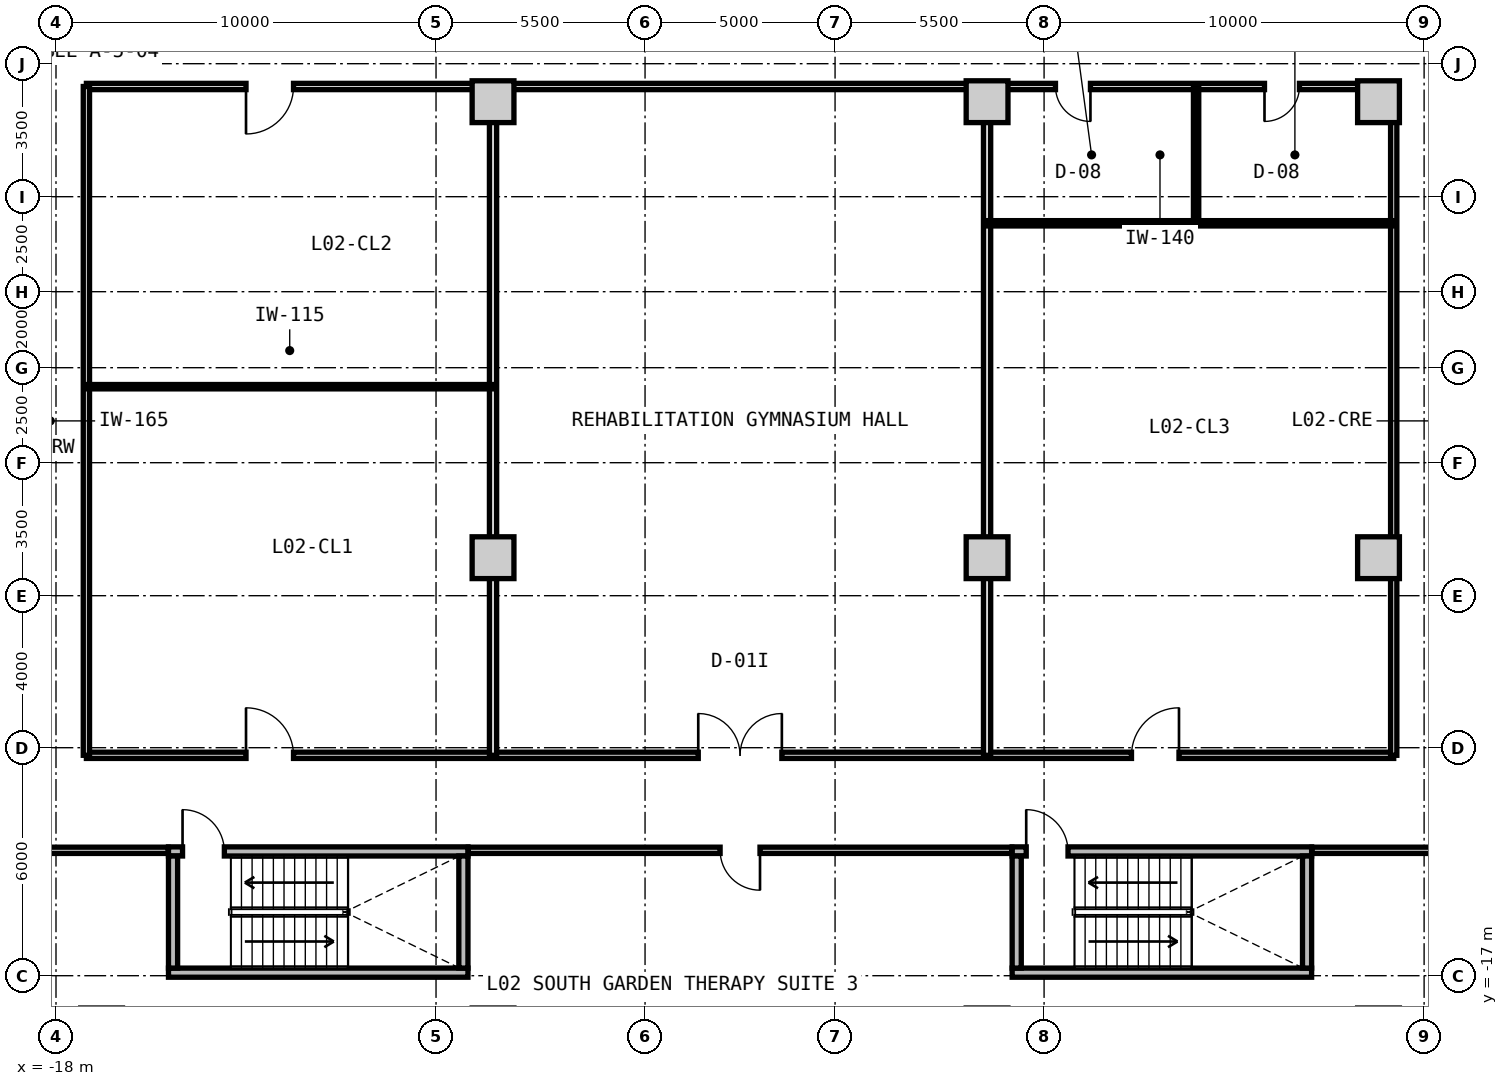
"""IFC4 building model, lengths in metres.
Left out: names, types, materials, properties, quantities, classifications, styles, units other than length and angle.
Written with IfcOpenShell. Run it as: python <this file> out.ifc"""

import sys

from ifc_helpers import new_model, si_unit, direction, frame, frame_2d, origin, origin_2d, place, context, subcontext, project, spatial, rectangle, extrude, source, transform, mapped, element, fill, save


model = new_model("IFC4")
c1 = context("Model", 3, precision=1e-05, world=origin(), true_north=direction((0.0, 1.0)))
c2 = subcontext(c1, "Body", "Model", "MODEL_VIEW")
j1 = project(units=[si_unit("LENGTHUNIT", "METRE"), si_unit("PLANEANGLEUNIT", "RADIAN")], contexts=[c1])
p1 = place(None, origin())
s1 = spatial("IfcSite", under=j1, at=p1, CompositionType="ELEMENT")
p2 = place(p1, origin())
s2 = spatial("IfcBuilding", under=s1, at=p2, CompositionType="ELEMENT")
p3 = place(p2, frame((0.0, 0.0, 8.4)))
s3 = spatial("IfcBuildingStorey", under=s2, at=p3, CompositionType="ELEMENT", Elevation=8.4)
m1 = source(origin(), c2, "Body", "SweptSolid", [
    extrude(rectangle(XDim=1.1, YDim=1.1, at=origin_2d()), origin(), (0.0, 0.0, 1.0), 4.2),
])
for number, where, z_axis, x_axis in (
    (1, (-6.5, -6.0, 0.0), (0.0, 0.0, 1.0), (1.0, 0.0, 0.0)),
    (2, (-6.5, 6.0, 0.0), (0.0, 0.0, 1.0), (1.0, 0.0, 0.0)),
    (3, (6.5, -6.0, 0.0), (0.0, 0.0, 1.0), (1.0, 0.0, 0.0)),
    (4, (6.5, 6.0, 0.0), (0.0, 0.0, 1.0), (1.0, 0.0, 0.0)),
    (5, (16.8, -6.0, 0.0), (0.0, 0.0, 1.0), (1.0, 0.0, 0.0)),
    (6, (16.8, 6.0, 0.0), (0.0, 0.0, 1.0), (1.0, 0.0, 0.0)),
):
    element("IfcColumn", number, at=place(p3, frame(where, z_axis=z_axis, x_axis=x_axis)), inside=s3, PredefinedType="COLUMN", context=c2, shape_type="MappedRepresentation", body=[
        mapped(m1, transform((0.0, 0.0, 0.0), x_axis=(1.0, 0.0, 0.0), y_axis=(0.0, 1.0, 0.0), z_axis=(0.0, 0.0, 1.0), scale=1.0)),
    ])
m2 = source(origin(), c2, "Body", "SweptSolid", [
    extrude(rectangle(XDim=7.88, YDim=0.24, at=frame_2d((3.94, 0.0))), origin(), (0.0, 0.0, 1.0), 3.88),
])
p4 = place(p3, frame((-15.04, -13.73, 0.0), z_axis=(0.0, 0.0, 1.0), x_axis=(1.0, 0.0, 0.0)))
e7 = element("IfcWall", 7, at=p4, inside=s3, PredefinedType="PARTITIONING", context=c2, shape_type="MappedRepresentation", body=[
    mapped(m2, transform((0.0, 0.0, 0.0), x_axis=(1.0, 0.0, 0.0), y_axis=(0.0, 1.0, 0.0), z_axis=(0.0, 0.0, 1.0), scale=1.0)),
])
p5 = place(p4, frame((0.37, 0.0, 0.0)))
e8 = element("IfcOpeningElement", 8, at=p5, cuts=e7, PredefinedType="OPENING", context=c2, shape_type="SweptSolid", body=[
    extrude(rectangle(XDim=1.1, YDim=2.15, at=frame_2d((0.55, 1.075))), frame((0.0, 0.13, 0.0), z_axis=(0.0, -1.0, 0.0), x_axis=(1.0, 0.0, 0.0)), (0.0, 0.0, 1.0), 0.26),
])
p6 = place(p3, frame((-15.04, -16.92, 0.0), z_axis=(0.0, 0.0, 1.0), x_axis=(1.0, 0.0, 0.0)))
e9 = element("IfcWall", 9, at=p6, inside=s3, PredefinedType="PARTITIONING", context=c2, shape_type="MappedRepresentation", body=[
    mapped(m2, transform((0.0, 0.0, 0.0), x_axis=(1.0, 0.0, 0.0), y_axis=(0.0, 1.0, 0.0), z_axis=(0.0, 0.0, 1.0), scale=1.0)),
])
m3 = source(origin(), c2, "Body", "SweptSolid", [
    extrude(rectangle(XDim=2.95, YDim=0.24, at=frame_2d((1.475, 0.0))), origin(), (0.0, 0.0, 1.0), 3.88),
])
for number, where, z_axis, x_axis in (
    (10, (-14.92, -16.8, 0.0), (0.0, 0.0, 1.0), (0.0, 1.0, 0.0)),
    (11, (-7.28, -16.8, 0.0), (0.0, 0.0, 1.0), (0.0, 1.0, 0.0)),
):
    element("IfcWall", number, at=place(p3, frame(where, z_axis=z_axis, x_axis=x_axis)), inside=s3, PredefinedType="PARTITIONING", context=c2, shape_type="MappedRepresentation", body=[
        mapped(m3, transform((0.0, 0.0, 0.0), x_axis=(1.0, 0.0, 0.0), y_axis=(0.0, 1.0, 0.0), z_axis=(0.0, 0.0, 1.0), scale=1.0)),
    ])
p7 = place(p3, frame((7.16, -13.73, 0.0), z_axis=(0.0, 0.0, 1.0), x_axis=(1.0, 0.0, 0.0)))
e12 = element("IfcWall", 12, at=p7, inside=s3, PredefinedType="PARTITIONING", context=c2, shape_type="MappedRepresentation", body=[
    mapped(m2, transform((0.0, 0.0, 0.0), x_axis=(1.0, 0.0, 0.0), y_axis=(0.0, 1.0, 0.0), z_axis=(0.0, 0.0, 1.0), scale=1.0)),
])
p8 = place(p7, frame((0.37, 0.0, 0.0)))
e13 = element("IfcOpeningElement", 13, at=p8, cuts=e12, PredefinedType="OPENING", context=c2, shape_type="SweptSolid", body=[
    extrude(rectangle(XDim=1.1, YDim=2.15, at=frame_2d((0.55, 1.075))), frame((0.0, 0.13, 0.0), z_axis=(0.0, -1.0, 0.0), x_axis=(1.0, 0.0, 0.0)), (0.0, 0.0, 1.0), 0.26),
])
p9 = place(p3, frame((7.16, -16.92, 0.0), z_axis=(0.0, 0.0, 1.0), x_axis=(1.0, 0.0, 0.0)))
e14 = element("IfcWall", 14, at=p9, inside=s3, PredefinedType="PARTITIONING", context=c2, shape_type="MappedRepresentation", body=[
    mapped(m2, transform((0.0, 0.0, 0.0), x_axis=(1.0, 0.0, 0.0), y_axis=(0.0, 1.0, 0.0), z_axis=(0.0, 0.0, 1.0), scale=1.0)),
])
for number, where, z_axis, x_axis in (
    (15, (7.28, -16.8, 0.0), (0.0, 0.0, 1.0), (0.0, 1.0, 0.0)),
    (16, (14.92, -16.8, 0.0), (0.0, 0.0, 1.0), (0.0, 1.0, 0.0)),
):
    element("IfcWall", number, at=place(p3, frame(where, z_axis=z_axis, x_axis=x_axis)), inside=s3, PredefinedType="PARTITIONING", context=c2, shape_type="MappedRepresentation", body=[
        mapped(m3, transform((0.0, 0.0, 0.0), x_axis=(1.0, 0.0, 0.0), y_axis=(0.0, 1.0, 0.0), z_axis=(0.0, 0.0, 1.0), scale=1.0)),
    ])
m4 = source(origin(), c2, "Body", "SweptSolid", [
    extrude(rectangle(XDim=34.4, YDim=0.165, at=frame_2d((17.2, 0.0))), origin(), (0.0, 0.0, 1.0), 3.865),
])
p10 = place(p3, frame((-17.2, -11.2, 0.0), z_axis=(0.0, 0.0, 1.0), x_axis=(1.0, 0.0, 0.0)))
e17 = element("IfcWall", 17, at=p10, inside=s3, PredefinedType="PARTITIONING", context=c2, shape_type="MappedRepresentation", body=[
    mapped(m4, transform((0.0, 0.0, 0.0), x_axis=(1.0, 0.0, 0.0), y_axis=(0.0, 1.0, 0.0), z_axis=(0.0, 0.0, 1.0), scale=1.0)),
])
p11 = place(p10, frame((4.2, 0.0, 0.0)))
e18 = element("IfcOpeningElement", 18, at=p11, cuts=e17, PredefinedType="OPENING", context=c2, shape_type="SweptSolid", body=[
    extrude(rectangle(XDim=1.25, YDim=2.2, at=frame_2d((0.625, 1.1))), frame((0.0, 0.093, 0.0), z_axis=(0.0, -1.0, 0.0), x_axis=(1.0, 0.0, 0.0)), (0.0, 0.0, 1.0), 0.185),
])
p12 = place(p10, frame((16.1, 0.0, 0.0)))
e19 = element("IfcOpeningElement", 19, at=p12, cuts=e17, PredefinedType="OPENING", context=c2, shape_type="SweptSolid", body=[
    extrude(rectangle(XDim=2.2, YDim=2.4, at=frame_2d((1.1, 1.2))), frame((0.0, 0.093, 0.0), z_axis=(0.0, -1.0, 0.0), x_axis=(1.0, 0.0, 0.0)), (0.0, 0.0, 1.0), 0.185),
])
p13 = place(p10, frame((27.5, 0.0, 0.0)))
e20 = element("IfcOpeningElement", 20, at=p13, cuts=e17, PredefinedType="OPENING", context=c2, shape_type="SweptSolid", body=[
    extrude(rectangle(XDim=1.25, YDim=2.2, at=frame_2d((0.625, 1.1))), frame((0.0, 0.093, 0.0), z_axis=(0.0, -1.0, 0.0), x_axis=(1.0, 0.0, 0.0)), (0.0, 0.0, 1.0), 0.185),
])
p14 = place(p3, frame((-17.2, 6.4, 0.0), z_axis=(0.0, 0.0, 1.0), x_axis=(1.0, 0.0, 0.0)))
e21 = element("IfcWall", 21, at=p14, inside=s3, PredefinedType="PARTITIONING", context=c2, shape_type="MappedRepresentation", body=[
    mapped(m4, transform((0.0, 0.0, 0.0), x_axis=(1.0, 0.0, 0.0), y_axis=(0.0, 1.0, 0.0), z_axis=(0.0, 0.0, 1.0), scale=1.0)),
])
p15 = place(p14, frame((4.2, 0.0, 0.0)))
e22 = element("IfcOpeningElement", 22, at=p15, cuts=e21, PredefinedType="OPENING", context=c2, shape_type="SweptSolid", body=[
    extrude(rectangle(XDim=1.25, YDim=2.2, at=frame_2d((0.625, 1.1))), frame((0.0, 0.093, 0.0), z_axis=(0.0, -1.0, 0.0), x_axis=(1.0, 0.0, 0.0)), (0.0, 0.0, 1.0), 0.185),
])
p16 = place(p14, frame((25.5, 0.0, 0.0)))
e23 = element("IfcOpeningElement", 23, at=p16, cuts=e21, PredefinedType="OPENING", context=c2, shape_type="SweptSolid", body=[
    extrude(rectangle(XDim=0.92, YDim=2.1, at=frame_2d((0.46, 1.05))), frame((0.0, 0.093, 0.0), z_axis=(0.0, -1.0, 0.0), x_axis=(1.0, 0.0, 0.0)), (0.0, 0.0, 1.0), 0.185),
])
p17 = place(p14, frame((31.0, 0.0, 0.0)))
e24 = element("IfcOpeningElement", 24, at=p17, cuts=e21, PredefinedType="OPENING", context=c2, shape_type="SweptSolid", body=[
    extrude(rectangle(XDim=0.92, YDim=2.1, at=frame_2d((0.46, 1.05))), frame((0.0, 0.093, 0.0), z_axis=(0.0, -1.0, 0.0), x_axis=(1.0, 0.0, 0.0)), (0.0, 0.0, 1.0), 0.185),
])
m5 = source(origin(), c2, "Body", "SweptSolid", [
    extrude(rectangle(XDim=17.6, YDim=0.165, at=frame_2d((8.8, 0.0))), origin(), (0.0, 0.0, 1.0), 3.865),
])
for number, where, z_axis, x_axis in (
    (25, (-17.2, -11.2, 0.0), (0.0, 0.0, 1.0), (0.0, 1.0, 0.0)),
    (26, (17.2, -11.2, 0.0), (0.0, 0.0, 1.0), (0.0, 1.0, 0.0)),
):
    element("IfcWall", number, at=place(p3, frame(where, z_axis=z_axis, x_axis=x_axis)), inside=s3, PredefinedType="PARTITIONING", context=c2, shape_type="MappedRepresentation", body=[
        mapped(m5, transform((0.0, 0.0, 0.0), x_axis=(1.0, 0.0, 0.0), y_axis=(0.0, 1.0, 0.0), z_axis=(0.0, 0.0, 1.0), scale=1.0)),
    ])
m6 = source(origin(), c2, "Body", "SweptSolid", [
    extrude(rectangle(XDim=17.6, YDim=0.19, at=frame_2d((8.8, 0.0))), origin(), (0.0, 0.0, 1.0), 3.215),
])
for number, where, z_axis, x_axis in (
    (27, (-6.5, -11.2, 0.0), (0.0, 0.0, 1.0), (0.0, 1.0, 0.0)),
    (28, (6.5, -11.2, 0.0), (0.0, 0.0, 1.0), (0.0, 1.0, 0.0)),
):
    element("IfcWall", number, at=place(p3, frame(where, z_axis=z_axis, x_axis=x_axis)), inside=s3, PredefinedType="PARTITIONING", context=c2, shape_type="MappedRepresentation", body=[
        mapped(m6, transform((0.0, 0.0, 0.0), x_axis=(1.0, 0.0, 0.0), y_axis=(0.0, 1.0, 0.0), z_axis=(0.0, 0.0, 1.0), scale=1.0)),
    ])
m7 = source(origin(), c2, "Body", "SweptSolid", [
    extrude(rectangle(XDim=10.7, YDim=0.115, at=frame_2d((5.35, 0.0))), origin(), (0.0, 0.0, 1.0), 3.865),
])
p18 = place(p3, frame((-17.2, -1.5, 0.0), z_axis=(0.0, 0.0, 1.0), x_axis=(1.0, 0.0, 0.0)))
e29 = element("IfcWall", 29, at=p18, inside=s3, PredefinedType="PARTITIONING", context=c2, shape_type="MappedRepresentation", body=[
    mapped(m7, transform((0.0, 0.0, 0.0), x_axis=(1.0, 0.0, 0.0), y_axis=(0.0, 1.0, 0.0), z_axis=(0.0, 0.0, 1.0), scale=1.0)),
])
m8 = source(origin(), c2, "Body", "SweptSolid", [
    extrude(rectangle(XDim=3.6, YDim=0.14, at=frame_2d((1.8, 0.0))), origin(), (0.0, 0.0, 1.0), 3.865),
])
p19 = place(p3, frame((12.0, 2.8, 0.0), z_axis=(0.0, 0.0, 1.0), x_axis=(0.0, 1.0, 0.0)))
e30 = element("IfcWall", 30, at=p19, inside=s3, PredefinedType="PARTITIONING", context=c2, shape_type="MappedRepresentation", body=[
    mapped(m8, transform((0.0, 0.0, 0.0), x_axis=(1.0, 0.0, 0.0), y_axis=(0.0, 1.0, 0.0), z_axis=(0.0, 0.0, 1.0), scale=1.0)),
])
m9 = source(origin(), c2, "Body", "SweptSolid", [
    extrude(rectangle(XDim=10.7, YDim=0.14, at=frame_2d((5.35, 0.0))), origin(), (0.0, 0.0, 1.0), 3.865),
])
p20 = place(p3, frame((6.5, 2.8, 0.0), z_axis=(0.0, 0.0, 1.0), x_axis=(1.0, 0.0, 0.0)))
e31 = element("IfcWall", 31, at=p20, inside=s3, PredefinedType="PARTITIONING", context=c2, shape_type="MappedRepresentation", body=[
    mapped(m9, transform((0.0, 0.0, 0.0), x_axis=(1.0, 0.0, 0.0), y_axis=(0.0, 1.0, 0.0), z_axis=(0.0, 0.0, 1.0), scale=1.0)),
])
m10 = source(origin(), c2, "Body", "SweptSolid", [
    extrude(rectangle(XDim=36.0, YDim=0.165, at=frame_2d((18.0, 0.0))), origin(), (0.0, 0.0, 1.0), 3.865),
])
p21 = place(p3, frame((-51.05, -13.7, 0.0), z_axis=(0.0, 0.0, 1.0), x_axis=(1.0, 0.0, 0.0)))
e32 = element("IfcWall", 32, at=p21, inside=s3, PredefinedType="PARTITIONING", context=c2, shape_type="MappedRepresentation", body=[
    mapped(m10, transform((0.0, 0.0, 0.0), x_axis=(1.0, 0.0, 0.0), y_axis=(0.0, 1.0, 0.0), z_axis=(0.0, 0.0, 1.0), scale=1.0)),
])
p22 = place(p21, frame((11.125, 0.0, 0.0)))
e33 = element("IfcOpeningElement", 33, at=p22, cuts=e32, PredefinedType="OPENING", context=c2, shape_type="SweptSolid", body=[
    extrude(rectangle(XDim=1.05, YDim=2.15, at=frame_2d((0.525, 1.075))), frame((0.0, 0.093, 0.0), z_axis=(0.0, -1.0, 0.0), x_axis=(1.0, 0.0, 0.0)), (0.0, 0.0, 1.0), 0.185),
])
p23 = place(p21, frame((29.0, 0.0, 0.0)))
e34 = element("IfcOpeningElement", 34, at=p23, cuts=e32, PredefinedType="OPENING", context=c2, shape_type="SweptSolid", body=[
    extrude(rectangle(XDim=1.05, YDim=2.15, at=frame_2d((0.525, 1.075))), frame((0.0, 0.093, 0.0), z_axis=(0.0, -1.0, 0.0), x_axis=(1.0, 0.0, 0.0)), (0.0, 0.0, 1.0), 0.185),
])
m11 = source(origin(), c2, "Body", "SweptSolid", [
    extrude(rectangle(XDim=14.3, YDim=0.165, at=frame_2d((7.15, 0.0))), origin(), (0.0, 0.0, 1.0), 3.865),
])
p24 = place(p3, frame((-7.15, -13.7, 0.0), z_axis=(0.0, 0.0, 1.0), x_axis=(1.0, 0.0, 0.0)))
e35 = element("IfcWall", 35, at=p24, inside=s3, PredefinedType="PARTITIONING", context=c2, shape_type="MappedRepresentation", body=[
    mapped(m11, transform((0.0, 0.0, 0.0), x_axis=(1.0, 0.0, 0.0), y_axis=(0.0, 1.0, 0.0), z_axis=(0.0, 0.0, 1.0), scale=1.0)),
])
p25 = place(p24, frame((6.625, 0.0, 0.0)))
e36 = element("IfcOpeningElement", 36, at=p25, cuts=e35, PredefinedType="OPENING", context=c2, shape_type="SweptSolid", body=[
    extrude(rectangle(XDim=1.05, YDim=2.15, at=frame_2d((0.525, 1.075))), frame((0.0, 0.093, 0.0), z_axis=(0.0, -1.0, 0.0), x_axis=(1.0, 0.0, 0.0)), (0.0, 0.0, 1.0), 0.185),
])
p26 = place(p3, frame((15.05, -13.7, 0.0), z_axis=(0.0, 0.0, 1.0), x_axis=(1.0, 0.0, 0.0)))
e37 = element("IfcWall", 37, at=p26, inside=s3, PredefinedType="PARTITIONING", context=c2, shape_type="MappedRepresentation", body=[
    mapped(m10, transform((0.0, 0.0, 0.0), x_axis=(1.0, 0.0, 0.0), y_axis=(0.0, 1.0, 0.0), z_axis=(0.0, 0.0, 1.0), scale=1.0)),
])
p27 = place(p26, frame((5.95, 0.0, 0.0)))
e38 = element("IfcOpeningElement", 38, at=p27, cuts=e37, PredefinedType="OPENING", context=c2, shape_type="SweptSolid", body=[
    extrude(rectangle(XDim=1.05, YDim=2.15, at=frame_2d((0.525, 1.075))), frame((0.0, 0.093, 0.0), z_axis=(0.0, -1.0, 0.0), x_axis=(1.0, 0.0, 0.0)), (0.0, 0.0, 1.0), 0.185),
])
p28 = place(p26, frame((23.825, 0.0, 0.0)))
e39 = element("IfcOpeningElement", 39, at=p28, cuts=e37, PredefinedType="OPENING", context=c2, shape_type="SweptSolid", body=[
    extrude(rectangle(XDim=1.05, YDim=2.15, at=frame_2d((0.525, 1.075))), frame((0.0, 0.093, 0.0), z_axis=(0.0, -1.0, 0.0), x_axis=(1.0, 0.0, 0.0)), (0.0, 0.0, 1.0), 0.185),
])
m12 = source(origin(), c2, "Body", "SweptSolid", [
    extrude(rectangle(XDim=1.1, YDim=2.15, at=frame_2d((0.55, 1.075))), frame((0.0, 0.025, 0.0), z_axis=(0.0, -1.0, 0.0), x_axis=(1.0, 0.0, 0.0)), (0.0, 0.0, 1.0), 0.05),
])
p29 = place(p5, origin())
e40 = element("IfcDoor", 40, at=p29, inside=s3, OperationType="SINGLE_SWING_LEFT", PredefinedType="DOOR", context=c2, shape_type="MappedRepresentation", body=[
    mapped(m12, transform((0.0, 0.0, 0.0), x_axis=(1.0, 0.0, 0.0), y_axis=(0.0, 1.0, 0.0), z_axis=(0.0, 0.0, 1.0), scale=1.0)),
])
fill(e8, e40)
p30 = place(p8, origin())
e41 = element("IfcDoor", 41, at=p30, inside=s3, OperationType="SINGLE_SWING_LEFT", PredefinedType="DOOR", context=c2, shape_type="MappedRepresentation", body=[
    mapped(m12, transform((0.0, 0.0, 0.0), x_axis=(1.0, 0.0, 0.0), y_axis=(0.0, 1.0, 0.0), z_axis=(0.0, 0.0, 1.0), scale=1.0)),
])
fill(e13, e41)
m13 = source(origin(), c2, "Body", "SweptSolid", [
    extrude(rectangle(XDim=1.25, YDim=2.2, at=frame_2d((0.625, 1.1))), frame((0.0, 0.025, 0.0), z_axis=(0.0, -1.0, 0.0), x_axis=(1.0, 0.0, 0.0)), (0.0, 0.0, 1.0), 0.05),
])
p31 = place(p11, origin())
e42 = element("IfcDoor", 42, at=p31, inside=s3, OperationType="SINGLE_SWING_LEFT", PredefinedType="DOOR", context=c2, shape_type="MappedRepresentation", body=[
    mapped(m13, transform((0.0, 0.0, 0.0), x_axis=(1.0, 0.0, 0.0), y_axis=(0.0, 1.0, 0.0), z_axis=(0.0, 0.0, 1.0), scale=1.0)),
])
fill(e18, e42)
m14 = source(origin(), c2, "Body", "SweptSolid", [
    extrude(rectangle(XDim=2.2, YDim=2.4, at=frame_2d((1.1, 1.2))), frame((0.0, 0.025, 0.0), z_axis=(0.0, -1.0, 0.0), x_axis=(1.0, 0.0, 0.0)), (0.0, 0.0, 1.0), 0.05),
])
p32 = place(p12, origin())
e43 = element("IfcDoor", 43, at=p32, inside=s3, OperationType="DOUBLE_DOOR_SINGLE_SWING", PredefinedType="DOOR", context=c2, shape_type="MappedRepresentation", body=[
    mapped(m14, transform((0.0, 0.0, 0.0), x_axis=(1.0, 0.0, 0.0), y_axis=(0.0, 1.0, 0.0), z_axis=(0.0, 0.0, 1.0), scale=1.0)),
])
fill(e19, e43)
p33 = place(p13, origin())
e44 = element("IfcDoor", 44, at=p33, inside=s3, OperationType="SINGLE_SWING_RIGHT", PredefinedType="DOOR", context=c2, shape_type="MappedRepresentation", body=[
    mapped(m13, transform((0.0, 0.0, 0.0), x_axis=(1.0, 0.0, 0.0), y_axis=(0.0, 1.0, 0.0), z_axis=(0.0, 0.0, 1.0), scale=1.0)),
])
fill(e20, e44)
p34 = place(p15, frame((1.25, 0.0, 0.0), z_axis=(0.0, 0.0, 1.0), x_axis=(-1.0, 0.0, 0.0)))
e45 = element("IfcDoor", 45, at=p34, inside=s3, OperationType="SINGLE_SWING_RIGHT", PredefinedType="DOOR", context=c2, shape_type="MappedRepresentation", body=[
    mapped(m13, transform((0.0, 0.0, 0.0), x_axis=(1.0, 0.0, 0.0), y_axis=(0.0, 1.0, 0.0), z_axis=(0.0, 0.0, 1.0), scale=1.0)),
])
fill(e22, e45)
m15 = source(origin(), c2, "Body", "SweptSolid", [
    extrude(rectangle(XDim=0.92, YDim=2.1, at=frame_2d((0.46, 1.05))), frame((0.0, 0.025, 0.0), z_axis=(0.0, -1.0, 0.0), x_axis=(1.0, 0.0, 0.0)), (0.0, 0.0, 1.0), 0.05),
])
p35 = place(p16, frame((0.92, 0.0, 0.0), z_axis=(0.0, 0.0, 1.0), x_axis=(-1.0, 0.0, 0.0)))
e46 = element("IfcDoor", 46, at=p35, inside=s3, OperationType="SINGLE_SWING_LEFT", PredefinedType="DOOR", context=c2, shape_type="MappedRepresentation", body=[
    mapped(m15, transform((0.0, 0.0, 0.0), x_axis=(1.0, 0.0, 0.0), y_axis=(0.0, 1.0, 0.0), z_axis=(0.0, 0.0, 1.0), scale=1.0)),
])
fill(e23, e46)
p36 = place(p17, frame((0.92, 0.0, 0.0), z_axis=(0.0, 0.0, 1.0), x_axis=(-1.0, 0.0, 0.0)))
e47 = element("IfcDoor", 47, at=p36, inside=s3, OperationType="SINGLE_SWING_RIGHT", PredefinedType="DOOR", context=c2, shape_type="MappedRepresentation", body=[
    mapped(m15, transform((0.0, 0.0, 0.0), x_axis=(1.0, 0.0, 0.0), y_axis=(0.0, 1.0, 0.0), z_axis=(0.0, 0.0, 1.0), scale=1.0)),
])
fill(e24, e47)
m16 = source(origin(), c2, "Body", "SweptSolid", [
    extrude(rectangle(XDim=1.05, YDim=2.15, at=frame_2d((0.525, 1.075))), frame((0.0, 0.025, 0.0), z_axis=(0.0, -1.0, 0.0), x_axis=(1.0, 0.0, 0.0)), (0.0, 0.0, 1.0), 0.05),
])
p37 = place(p25, frame((1.05, 0.0, 0.0), z_axis=(0.0, 0.0, 1.0), x_axis=(-1.0, 0.0, 0.0)))
e48 = element("IfcDoor", 48, at=p37, inside=s3, OperationType="SINGLE_SWING_LEFT", PredefinedType="DOOR", context=c2, shape_type="MappedRepresentation", body=[
    mapped(m16, transform((0.0, 0.0, 0.0), x_axis=(1.0, 0.0, 0.0), y_axis=(0.0, 1.0, 0.0), z_axis=(0.0, 0.0, 1.0), scale=1.0)),
])
fill(e36, e48)
save(model, sys.argv[1])
